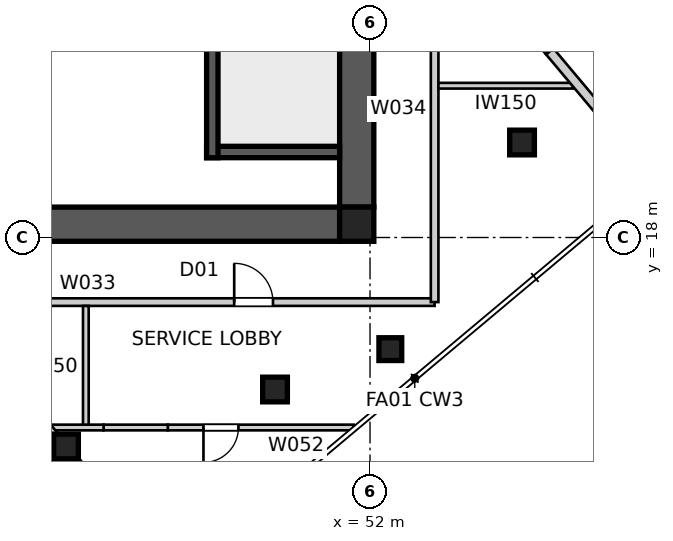
"""IFC4 building model, lengths in metres.
Left out: names, types, materials, properties, quantities, classifications, styles, units other than length and angle.
Written with IfcOpenShell. Run it as: python <this file> out.ifc"""

import sys

from ifc_helpers import new_model, si_unit, direction, frame, frame_2d, origin, origin_2d, place, context, subcontext, project, spatial, polyline, rectangle, outline, extrude, element, fill, save


model = new_model("IFC4")
c1 = context("Model", 3, precision=1e-05, world=origin(), true_north=direction((0.0, 1.0)))
c2 = subcontext(c1, "Body", "Model", "MODEL_VIEW")
j1 = project(units=[si_unit("LENGTHUNIT", "METRE"), si_unit("PLANEANGLEUNIT", "RADIAN")], contexts=[c1])
p1 = place(None, origin())
s1 = spatial("IfcSite", under=j1, at=p1, CompositionType="ELEMENT")
p2 = place(p1, origin())
s2 = spatial("IfcBuilding", under=s1, at=p2, CompositionType="ELEMENT")
p3 = place(p2, frame((0.0, 0.0, 299.8)))
s3 = spatial("IfcBuildingStorey", under=s2, at=p3, CompositionType="ELEMENT", Elevation=299.8)
p4 = place(p3, frame((51.2, 18.35, 0.0), z_axis=(0.0, 0.0, 1.0), x_axis=(-1.0, 0.0, 0.0)))
e1 = element("IfcWall", 1, at=p4, inside=s3, PredefinedType="SHEAR", context=c2, shape_type="SweptSolid", body=[
    extrude(outline(polyline([(0.0, -0.45), (22.4, -0.45), (22.4, -0.025), (22.85, -0.025), (22.85, 0.025), (22.4, 0.025), (22.4, 0.45), (0.0, 0.45), (0.0, 0.025), (-0.45, 0.025), (-0.45, -0.025), (0.0, -0.025), (0.0, -0.45)])), origin(), (0.0, 0.0, 1.0), 4.5),
])
p5 = place(p3, frame((51.65, 18.8, 0.0), z_axis=(0.0, 0.0, 1.0), x_axis=(0.0, 1.0, 0.0)))
e2 = element("IfcWall", 2, at=p5, inside=s3, PredefinedType="SHEAR", context=c2, shape_type="SweptSolid", body=[
    extrude(outline(polyline([(0.0, -0.45), (22.4, -0.45), (22.4, -0.025), (22.85, -0.025), (22.85, 0.025), (22.4, 0.025), (22.4, 0.45), (0.0, 0.45), (0.0, 0.025), (-0.45, 0.025), (-0.45, -0.025), (0.0, -0.025), (0.0, -0.45)])), origin(), (0.0, 0.0, 1.0), 4.5),
])
p6 = place(p5, frame((11.14, 0.0, 0.0)))
e3 = element("IfcOpeningElement", 3, at=p6, cuts=e2, PredefinedType="OPENING", context=c2, shape_type="SweptSolid", body=[
    extrude(rectangle(XDim=1.02, YDim=2.4, at=frame_2d((0.51, 1.2))), frame((0.0, 0.46, 0.0), z_axis=(0.0, -1.0, 0.0), x_axis=(1.0, 0.0, 0.0)), (0.0, 0.0, 1.0), 0.92),
])
p7 = place(p3, frame((47.85, 27.8, 0.0), z_axis=(0.0, 0.0, 1.0), x_axis=(0.0, -1.0, 0.0)))
e4 = element("IfcWall", 4, at=p7, inside=s3, PredefinedType="SHEAR", context=c2, shape_type="SweptSolid", body=[
    extrude(rectangle(XDim=7.7, YDim=0.3, at=frame_2d((3.85, 0.0))), origin(), (0.0, 0.0, 1.0), 4.5),
])
p8 = place(p3, frame((51.2, 20.25, 0.0), z_axis=(0.0, 0.0, 1.0), x_axis=(-1.0, 0.0, 0.0)))
e5 = element("IfcWall", 5, at=p8, inside=s3, PredefinedType="SHEAR", context=c2, shape_type="SweptSolid", body=[
    extrude(rectangle(XDim=3.5, YDim=0.3, at=frame_2d((1.75, 0.0))), origin(), (0.0, 0.0, 1.0), 4.5),
])
p9 = place(p3, frame((51.65, 18.35, 0.0), z_axis=(0.0, 0.0, 1.0), x_axis=(1.0, 0.0, 0.0)))
e6 = element("IfcColumn", 6, at=p9, inside=s3, PredefinedType="COLUMN", context=c2, shape_type="SweptSolid", body=[
    extrude(rectangle(XDim=0.9, YDim=0.9, at=origin_2d()), origin(), (0.0, 0.0, 1.0), 4.5),
])
p10 = place(p3, frame((52.534, 15.062, 0.0), z_axis=(0.0, 0.0, 1.0), x_axis=(1.0, 0.0, 0.0)))
e7 = element("IfcColumn", 7, at=p10, inside=s3, PredefinedType="COLUMN", context=c2, shape_type="SweptSolid", body=[
    extrude(rectangle(XDim=0.6, YDim=0.6, at=origin_2d()), origin(), (0.0, 0.0, 1.0), 4.5),
])
for number, where, z_axis, x_axis in (
    (8, (44.0, 12.5, 0.0), (0.0, 0.0, 1.0), (1.0, 0.0, 0.0)),
    (9, (49.5, 14.0, 0.0), (0.0, 0.0, 1.0), (1.0, 0.0, 0.0)),
    (10, (56.0, 20.5, 0.0), (0.0, 0.0, 1.0), (1.0, 0.0, 0.0)),
):
    element("IfcColumn", number, at=place(p3, frame(where, z_axis=z_axis, x_axis=x_axis)), inside=s3, PredefinedType="COLUMN", context=c2, shape_type="SweptSolid", body=[
        extrude(rectangle(XDim=0.65, YDim=0.65, at=origin_2d()), origin(), (0.0, 0.0, 1.0), 4.5),
    ])
p11 = place(p3, frame((26.3, 16.3, 0.0), z_axis=(0.0, 0.0, 1.0), x_axis=(1.0, 0.0, 0.0)))
e11 = element("IfcWall", 11, at=p11, inside=s3, PredefinedType="PARTITIONING", context=c2, shape_type="SweptSolid", body=[
    extrude(rectangle(XDim=27.4, YDim=0.2, at=frame_2d((13.7, 0.0))), origin(), (0.0, 0.0, 1.0), 4.3),
])
p12 = place(p11, frame((22.126, 0.0, 0.0)))
e12 = element("IfcOpeningElement", 12, at=p12, cuts=e11, PredefinedType="OPENING", context=c2, shape_type="SweptSolid", body=[
    extrude(rectangle(XDim=1.02, YDim=2.34, at=frame_2d((0.51, 1.17))), frame((0.0, 0.11, 0.0), z_axis=(0.0, -1.0, 0.0), x_axis=(1.0, 0.0, 0.0)), (0.0, 0.0, 1.0), 0.22),
])
p13 = place(p11, frame((13.395, 0.0, 0.0)))
e13 = element("IfcOpeningElement", 13, at=p13, cuts=e11, PredefinedType="OPENING", context=c2, shape_type="SweptSolid", body=[
    extrude(rectangle(XDim=1.02, YDim=2.34, at=frame_2d((0.51, 1.17))), frame((0.0, 0.11, 0.0), z_axis=(0.0, -1.0, 0.0), x_axis=(1.0, 0.0, 0.0)), (0.0, 0.0, 1.0), 0.22),
])
p14 = place(p11, frame((6.053, 0.0, 0.0)))
e14 = element("IfcOpeningElement", 14, at=p14, cuts=e11, PredefinedType="OPENING", context=c2, shape_type="SweptSolid", body=[
    extrude(rectangle(XDim=1.02, YDim=2.34, at=frame_2d((0.51, 1.17))), frame((0.0, 0.11, 0.0), z_axis=(0.0, -1.0, 0.0), x_axis=(1.0, 0.0, 0.0)), (0.0, 0.0, 1.0), 0.22),
])
p15 = place(p3, frame((53.7, 16.3, 0.0), z_axis=(0.0, 0.0, 1.0), x_axis=(0.0, 1.0, 0.0)))
e15 = element("IfcWall", 15, at=p15, inside=s3, PredefinedType="PARTITIONING", context=c2, shape_type="SweptSolid", body=[
    extrude(rectangle(XDim=27.4, YDim=0.2, at=frame_2d((13.7, 0.0))), origin(), (0.0, 0.0, 1.0), 4.3),
])
p16 = place(p15, frame((10.146, 0.0, 0.0)))
e16 = element("IfcOpeningElement", 16, at=p16, cuts=e15, PredefinedType="OPENING", context=c2, shape_type="SweptSolid", body=[
    extrude(rectangle(XDim=1.02, YDim=2.34, at=frame_2d((0.51, 1.17))), frame((0.0, 0.11, 0.0), z_axis=(0.0, -1.0, 0.0), x_axis=(1.0, 0.0, 0.0)), (0.0, 0.0, 1.0), 0.22),
])
p17 = place(p15, frame((17.042, 0.0, 0.0)))
e17 = element("IfcOpeningElement", 17, at=p17, cuts=e15, PredefinedType="OPENING", context=c2, shape_type="SweptSolid", body=[
    extrude(rectangle(XDim=1.02, YDim=2.34, at=frame_2d((0.51, 1.17))), frame((0.0, 0.11, 0.0), z_axis=(0.0, -1.0, 0.0), x_axis=(1.0, 0.0, 0.0)), (0.0, 0.0, 1.0), 0.22),
])
p18 = place(p15, frame((23.434, 0.0, 0.0)))
e18 = element("IfcOpeningElement", 18, at=p18, cuts=e15, PredefinedType="OPENING", context=c2, shape_type="SweptSolid", body=[
    extrude(rectangle(XDim=1.02, YDim=2.34, at=frame_2d((0.51, 1.17))), frame((0.0, 0.11, 0.0), z_axis=(0.0, -1.0, 0.0), x_axis=(1.0, 0.0, 0.0)), (0.0, 0.0, 1.0), 0.22),
])
p19 = place(p3, frame((46.857, 8.993, 0.0), z_axis=(0.0, 0.0, 1.0), x_axis=(-0.64278692291, 0.766045019392, 0.0)))
e19 = element("IfcWall", 19, at=p19, inside=s3, PredefinedType="PARTITIONING", context=c2, shape_type="SweptSolid", body=[
    extrude(rectangle(XDim=9.343, YDim=0.25, at=frame_2d((4.671, 0.0))), origin(), (0.0, 0.0, 1.0), 4.3),
])
p20 = place(p3, frame((58.854, 20.365, 0.0), z_axis=(0.0, 0.0, 1.0), x_axis=(-0.642823301165, 0.766014492995, 0.0)))
e20 = element("IfcWall", 20, at=p20, inside=s3, PredefinedType="PARTITIONING", context=c2, shape_type="SweptSolid", body=[
    extrude(rectangle(XDim=3.308, YDim=0.25, at=frame_2d((1.654, 0.0))), origin(), (0.0, 0.0, 1.0), 3.688),
])
p21 = place(p3, frame((56.728, 22.899, 0.0), z_axis=(0.0, 0.0, 1.0), x_axis=(-0.642778620996, 0.766051985436, 0.0)))
e21 = element("IfcWall", 21, at=p21, inside=s3, PredefinedType="PARTITIONING", context=c2, shape_type="SweptSolid", body=[
    extrude(rectangle(XDim=4.446, YDim=0.25, at=frame_2d((2.223, 0.0))), origin(), (0.0, 0.0, 1.0), 4.3),
])
p22 = place(p3, frame((53.8, 21.994, 0.0), z_axis=(0.0, 0.0, 1.0), x_axis=(1.0, 0.0, 0.0)))
e22 = element("IfcWall", 22, at=p22, inside=s3, PredefinedType="SOLIDWALL", context=c2, shape_type="SweptSolid", body=[
    extrude(rectangle(XDim=3.544, YDim=0.15, at=frame_2d((1.772, 0.0))), origin(), (0.0, 0.0, 1.0), 4.3),
])
p23 = place(p3, frame((44.522, 13.0, 0.0), z_axis=(0.0, 0.0, 1.0), x_axis=(0.0, 1.0, 0.0)))
e23 = element("IfcWall", 23, at=p23, inside=s3, PredefinedType="SOLIDWALL", context=c2, shape_type="SweptSolid", body=[
    extrude(rectangle(XDim=3.2, YDim=0.15, at=frame_2d((1.6, 0.0))), origin(), (0.0, 0.0, 1.0), 4.3),
])
p24 = place(p3, frame((51.57, 13.0, 0.0), z_axis=(0.0, 0.0, 1.0), x_axis=(-1.0, 0.0, 0.0)))
e24 = element("IfcWall", 24, at=p24, inside=s3, PredefinedType="SOLIDWALL", context=c2, shape_type="SweptSolid", body=[
    extrude(rectangle(XDim=4.892, YDim=0.15, at=frame_2d((2.446, 0.0))), origin(), (0.0, 0.0, 1.0), 4.3),
])
p25 = place(p24, frame((3.033, 0.0, 0.0)))
e25 = element("IfcOpeningElement", 25, at=p25, cuts=e24, PredefinedType="OPENING", context=c2, shape_type="SweptSolid", body=[
    extrude(rectangle(XDim=0.92, YDim=2.1, at=frame_2d((0.46, 1.05))), frame((0.0, 0.085, 0.0), z_axis=(0.0, -1.0, 0.0), x_axis=(1.0, 0.0, 0.0)), (0.0, 0.0, 1.0), 0.17),
])
p26 = place(p3, frame((46.678, 13.0, 0.0), z_axis=(0.0, 0.0, 1.0), x_axis=(-1.0, 0.0, 0.0)))
e26 = element("IfcWall", 26, at=p26, inside=s3, PredefinedType="SOLIDWALL", context=c2, shape_type="SweptSolid", body=[
    extrude(rectangle(XDim=1.69, YDim=0.15, at=frame_2d((0.845, 0.0))), origin(), (0.0, 0.0, 1.0), 3.3),
])
p27 = place(p3, frame((44.988, 13.0, 0.0), z_axis=(0.0, 0.0, 1.0), x_axis=(-1.0, 0.0, 0.0)))
e27 = element("IfcWall", 27, at=p27, inside=s3, PredefinedType="SOLIDWALL", context=c2, shape_type="SweptSolid", body=[
    extrude(rectangle(XDim=9.977, YDim=0.15, at=frame_2d((4.988, 0.0))), origin(), (0.0, 0.0, 1.0), 4.3),
])
p28 = place(p12, origin())
e28 = element("IfcDoor", 28, at=p28, inside=s3, OperationType="SINGLE_SWING_LEFT", PredefinedType="DOOR", context=c2, shape_type="SweptSolid", body=[
    extrude(rectangle(XDim=1.02, YDim=2.34, at=frame_2d((0.51, 1.17))), frame((0.0, 0.025, 0.0), z_axis=(0.0, -1.0, 0.0), x_axis=(1.0, 0.0, 0.0)), (0.0, 0.0, 1.0), 0.05),
])
fill(e12, e28)
p29 = place(p25, origin())
e29 = element("IfcDoor", 29, at=p29, inside=s3, OperationType="SINGLE_SWING_RIGHT", PredefinedType="DOOR", context=c2, shape_type="SweptSolid", body=[
    extrude(rectangle(XDim=0.92, YDim=2.1, at=frame_2d((0.46, 1.05))), frame((0.0, 0.025, 0.0), z_axis=(0.0, -1.0, 0.0), x_axis=(1.0, 0.0, 0.0)), (0.0, 0.0, 1.0), 0.05),
])
fill(e25, e29)
save(model, sys.argv[1])
